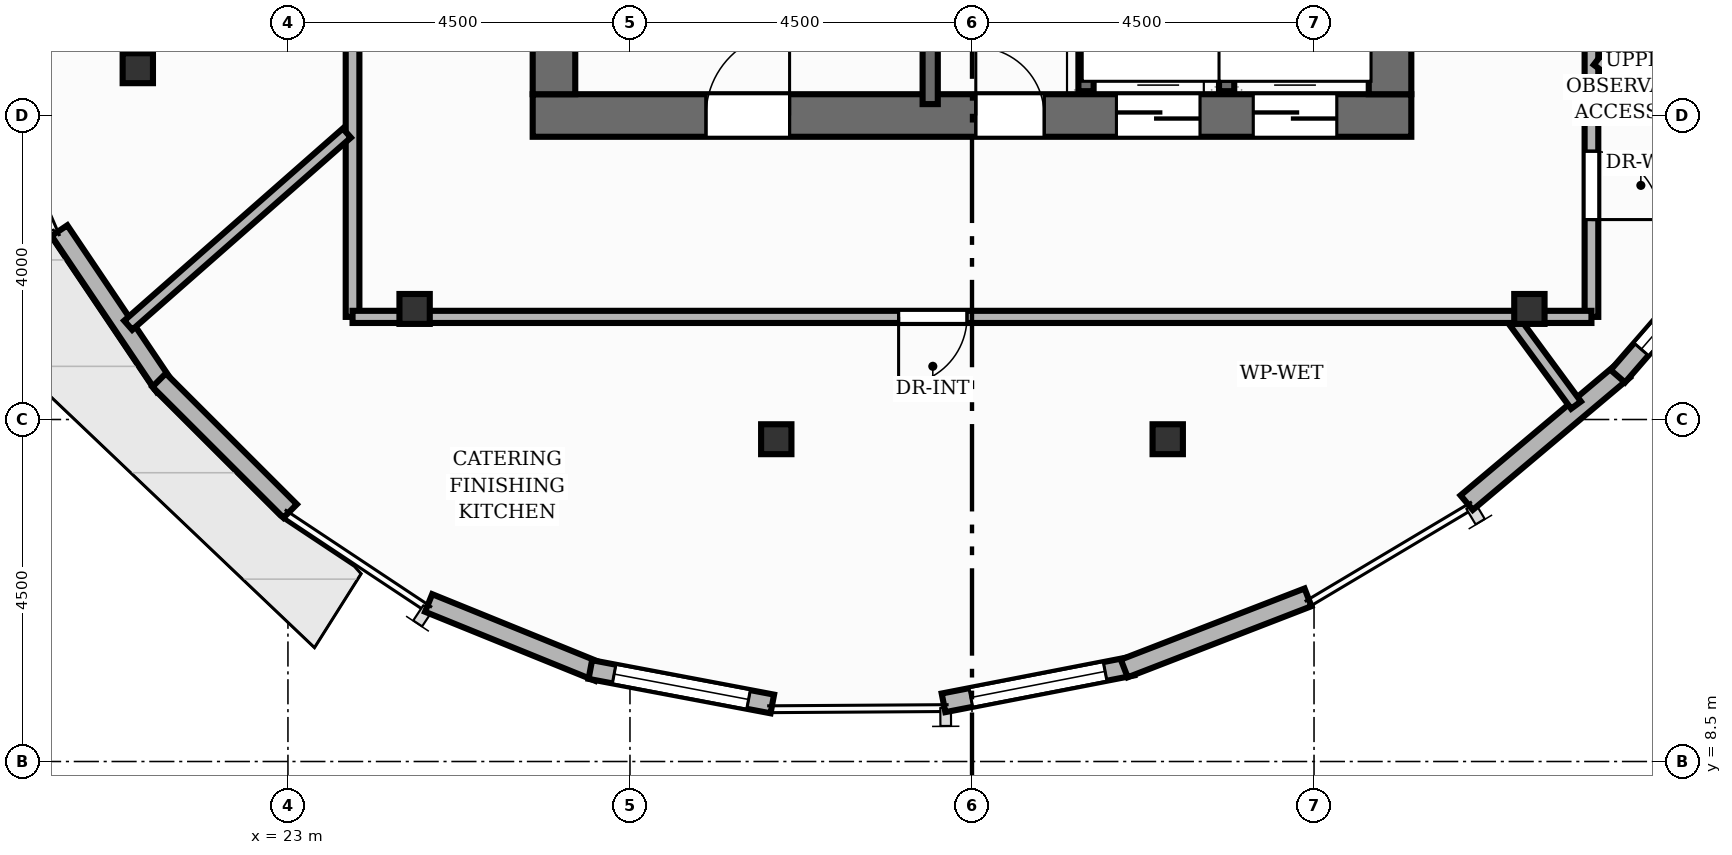
"""IFC4 building model, lengths in metres.
Left out: names, types, materials, properties, quantities, classifications, styles, units other than length and angle.
Written with IfcOpenShell. Run it as: python <this file> out.ifc"""

import sys

from ifc_helpers import new_model, si_unit, direction, frame, frame_2d, origin, origin_2d, place, context, subcontext, project, spatial, rectangle, i_section, extrude, element, fill, save


model = new_model("IFC4")
c1 = context("Model", 3, precision=1e-05, world=origin(), true_north=direction((0.0, 1.0)))
c2 = subcontext(c1, "Body", "Model", "MODEL_VIEW")
j1 = project(units=[si_unit("LENGTHUNIT", "METRE"), si_unit("PLANEANGLEUNIT", "RADIAN")], contexts=[c1])
p1 = place(None, origin())
s1 = spatial("IfcSite", under=j1, at=p1, CompositionType="ELEMENT")
p2 = place(p1, origin())
s2 = spatial("IfcBuilding", under=s1, at=p2, CompositionType="ELEMENT")
p3 = place(p2, frame((0.0, 0.0, 246.88)))
s3 = spatial("IfcBuildingStorey", under=s2, at=p3, CompositionType="ELEMENT", Elevation=246.88)
p4 = place(p3, frame((26.22, 17.0, 0.0), z_axis=(0.0, 0.0, 1.0), x_axis=(1.0, 0.0, 0.0)))
e1 = element("IfcWall", 1, at=p4, inside=s3, PredefinedType="SHEAR", context=c2, shape_type="SweptSolid", body=[
    extrude(rectangle(XDim=11.56, YDim=0.56, at=frame_2d((5.78, 0.0))), origin(), (0.0, 0.0, 1.0), 4.16),
])
p5 = place(p4, frame((2.28, 0.0, 0.0)))
e2 = element("IfcOpeningElement", 2, at=p5, cuts=e1, PredefinedType="OPENING", context=c2, shape_type="SweptSolid", body=[
    extrude(rectangle(XDim=1.1, YDim=2.15, at=frame_2d((0.55, 1.075))), frame((0.0, 0.29, 0.0), z_axis=(0.0, -1.0, 0.0), x_axis=(1.0, 0.0, 0.0)), (0.0, 0.0, 1.0), 0.58),
])
p6 = place(p4, frame((7.68, 0.0, 0.0)))
e3 = element("IfcOpeningElement", 3, at=p6, cuts=e1, PredefinedType="OPENING", context=c2, shape_type="SweptSolid", body=[
    extrude(rectangle(XDim=1.1, YDim=2.15, at=frame_2d((0.55, 1.075))), frame((0.0, 0.29, 0.0), z_axis=(0.0, -1.0, 0.0), x_axis=(1.0, 0.0, 0.0)), (0.0, 0.0, 1.0), 0.58),
])
p7 = place(p4, frame((9.48, 0.0, 0.0)))
e4 = element("IfcOpeningElement", 4, at=p7, cuts=e1, PredefinedType="OPENING", context=c2, shape_type="SweptSolid", body=[
    extrude(rectangle(XDim=1.1, YDim=2.15, at=frame_2d((0.55, 1.075))), frame((0.0, 0.29, 0.0), z_axis=(0.0, -1.0, 0.0), x_axis=(1.0, 0.0, 0.0)), (0.0, 0.0, 1.0), 0.58),
])
p8 = place(p4, frame((5.83, 0.0, 0.0)))
e5 = element("IfcOpeningElement", 5, at=p8, cuts=e1, PredefinedType="OPENING", context=c2, shape_type="SweptSolid", body=[
    extrude(rectangle(XDim=0.9, YDim=2.1, at=frame_2d((0.45, 1.05))), frame((0.0, 0.29, 0.0), z_axis=(0.0, -1.0, 0.0), x_axis=(1.0, 0.0, 0.0)), (0.0, 0.0, 1.0), 0.58),
])
for number, where, z_axis, x_axis in (
    (6, (26.5, 17.28, 0.0), (0.0, 0.0, 1.0), (0.0, 1.0, 0.0)),
    (7, (37.5, 17.28, 0.0), (0.0, 0.0, 1.0), (0.0, 1.0, 0.0)),
):
    element("IfcWall", number, at=place(p3, frame(where, z_axis=z_axis, x_axis=x_axis)), inside=s3, PredefinedType="SHEAR", context=c2, shape_type="SweptSolid", body=[
        extrude(rectangle(XDim=13.44, YDim=0.56, at=frame_2d((6.72, 0.0))), origin(), (0.0, 0.0, 1.0), 4.16),
    ])
for number, where, z_axis, x_axis in (
    (8, (21.025, 17.622, 0.0), (0.0, 0.0, 1.0), (1.0, 0.0, 0.0)),
    (9, (24.667, 14.455, 0.0), (0.0, 0.0, 1.0), (1.0, 0.0, 0.0)),
    (10, (29.425, 12.74, 0.0), (0.0, 0.0, 1.0), (1.0, 0.0, 0.0)),
    (11, (34.575, 12.74, 0.0), (0.0, 0.0, 1.0), (1.0, 0.0, 0.0)),
    (12, (39.333, 14.455, 0.0), (0.0, 0.0, 1.0), (1.0, 0.0, 0.0)),
):
    element("IfcColumn", number, at=place(p3, frame(where, z_axis=z_axis, x_axis=x_axis)), inside=s3, PredefinedType="COLUMN", context=c2, shape_type="SweptSolid", body=[
        extrude(i_section(OverallWidth=0.399, OverallDepth=0.394, WebThickness=0.023, FlangeThickness=0.037, at=origin_2d()), origin(), (0.0, 0.0, 1.0), 4.16),
    ])
p9 = place(p3, frame((21.377, 13.43, 0.0), z_axis=(0.0, 0.0, 1.0), x_axis=(-0.558536746098, 0.829479778691, 0.0)))
e13 = element("IfcWall", 13, at=p9, inside=s3, PredefinedType="SOLIDWALL", context=c2, shape_type="SweptSolid", body=[
    extrude(rectangle(XDim=2.478, YDim=0.25, at=frame_2d((1.239, 0.0))), origin(), (0.0, 0.0, 1.0), 3.84),
])
p10 = place(p3, frame((23.029, 11.796, 0.0), z_axis=(0.0, 0.0, 1.0), x_axis=(-0.707507464916, 0.70670587028, 0.0)))
e14 = element("IfcWall", 14, at=p10, inside=s3, PredefinedType="SOLIDWALL", context=c2, shape_type="SweptSolid", body=[
    extrude(rectangle(XDim=2.437, YDim=0.25, at=frame_2d((1.218, 0.0))), origin(), (0.0, 0.0, 1.0), 3.84),
])
p11 = place(p3, frame((27.088, 9.678, 0.0), z_axis=(0.0, 0.0, 1.0), x_axis=(-0.92656790733, 0.376127522399, 0.0)))
e15 = element("IfcWall", 15, at=p11, inside=s3, PredefinedType="SOLIDWALL", context=c2, shape_type="SweptSolid", body=[
    extrude(rectangle(XDim=2.415, YDim=0.25, at=frame_2d((1.207, 0.0))), origin(), (0.0, 0.0, 1.0), 3.84),
])
p12 = place(p3, frame((29.373, 9.257, 0.0), z_axis=(0.0, 0.0, 1.0), x_axis=(-0.982577169387, 0.185855067728, 0.0)))
e16 = element("IfcWall", 16, at=p12, inside=s3, PredefinedType="SOLIDWALL", context=c2, shape_type="SweptSolid", body=[
    extrude(rectangle(XDim=2.437, YDim=0.25, at=frame_2d((1.218, 0.0))), origin(), (0.0, 0.0, 1.0), 3.84),
])
p13 = place(p12, frame((0.318, 0.0, 0.85)))
e17 = element("IfcOpeningElement", 17, at=p13, cuts=e16, PredefinedType="OPENING", context=c2, shape_type="SweptSolid", body=[
    extrude(rectangle(XDim=1.8, YDim=2.0, at=frame_2d((0.9, 1.0))), frame((0.0, 0.135, 0.0), z_axis=(0.0, -1.0, 0.0), x_axis=(1.0, 0.0, 0.0)), (0.0, 0.0, 1.0), 0.27),
])
p14 = place(p3, frame((34.111, 9.755, 0.0), z_axis=(0.0, 0.0, 1.0), x_axis=(-0.98160535152, -0.190921276622, 0.0)))
e18 = element("IfcWall", 18, at=p14, inside=s3, PredefinedType="SOLIDWALL", context=c2, shape_type="SweptSolid", body=[
    extrude(rectangle(XDim=2.532, YDim=0.25, at=frame_2d((1.266, 0.0))), origin(), (0.0, 0.0, 1.0), 3.84),
])
p15 = place(p14, frame((0.366, 0.0, 0.85)))
e19 = element("IfcOpeningElement", 19, at=p15, cuts=e18, PredefinedType="OPENING", context=c2, shape_type="SweptSolid", body=[
    extrude(rectangle(XDim=1.8, YDim=2.0, at=frame_2d((0.9, 1.0))), frame((0.0, 0.135, 0.0), z_axis=(0.0, -1.0, 0.0), x_axis=(1.0, 0.0, 0.0)), (0.0, 0.0, 1.0), 0.27),
])
p16 = place(p3, frame((36.421, 10.66, 0.0), z_axis=(0.0, 0.0, 1.0), x_axis=(-0.932613090392, -0.360877851397, 0.0)))
e20 = element("IfcWall", 20, at=p16, inside=s3, PredefinedType="SOLIDWALL", context=c2, shape_type="SweptSolid", body=[
    extrude(rectangle(XDim=2.593, YDim=0.25, at=frame_2d((1.296, 0.0))), origin(), (0.0, 0.0, 1.0), 3.84),
])
p17 = place(p3, frame((40.575, 13.646, 0.0), z_axis=(0.0, 0.0, 1.0), x_axis=(-0.765011949935, -0.644016084005, 0.0)))
e21 = element("IfcWall", 21, at=p17, inside=s3, PredefinedType="SOLIDWALL", context=c2, shape_type="SweptSolid", body=[
    extrude(rectangle(XDim=2.702, YDim=0.25, at=frame_2d((1.351, 0.0))), origin(), (0.0, 0.0, 1.0), 3.84),
])
p18 = place(p3, frame((42.292, 15.637, 0.0), z_axis=(0.0, 0.0, 1.0), x_axis=(-0.655463265554, -0.755227056924, 0.0)))
e22 = element("IfcWall", 22, at=p18, inside=s3, PredefinedType="SOLIDWALL", context=c2, shape_type="SweptSolid", body=[
    extrude(rectangle(XDim=2.738, YDim=0.25, at=frame_2d((1.369, 0.0))), origin(), (0.0, 0.0, 1.0), 3.84),
])
p19 = place(p18, frame((0.469, 0.0, 0.85)))
e23 = element("IfcOpeningElement", 23, at=p19, cuts=e22, PredefinedType="OPENING", context=c2, shape_type="SweptSolid", body=[
    extrude(rectangle(XDim=1.8, YDim=2.0, at=frame_2d((0.9, 1.0))), frame((0.0, 0.135, 0.0), z_axis=(0.0, -1.0, 0.0), x_axis=(1.0, 0.0, 0.0)), (0.0, 0.0, 1.0), 0.27),
])
p20 = place(p3, frame((31.45, 17.15, 0.0), z_axis=(0.0, 0.0, 1.0), x_axis=(0.0, 1.0, 0.0)))
e24 = element("IfcWall", 24, at=p20, inside=s3, PredefinedType="SHEAR", context=c2, shape_type="SweptSolid", body=[
    extrude(rectangle(XDim=3.5, YDim=0.2, at=frame_2d((1.75, 0.0))), origin(), (0.0, 0.0, 1.0), 4.16),
])
for number, where, z_axis, x_axis in (
    (25, (33.5, 17.32, 0.0), (0.0, 0.0, 1.0), (0.0, 1.0, 0.0)),
    (26, (35.35, 17.32, 0.0), (0.0, 0.0, 1.0), (0.0, 1.0, 0.0)),
):
    element("IfcWall", number, at=place(p3, frame(where, z_axis=z_axis, x_axis=x_axis)), inside=s3, PredefinedType="SHEAR", context=c2, shape_type="SweptSolid", body=[
        extrude(rectangle(XDim=1.86, YDim=0.2, at=frame_2d((0.93, 0.0))), origin(), (0.0, 0.0, 1.0), 4.16),
    ])
p21 = place(p3, frame((40.15, 33.59, 0.0), z_axis=(0.0, 0.0, 1.0), x_axis=(0.0, -1.0, 0.0)))
e27 = element("IfcWall", 27, at=p21, inside=s3, PredefinedType="PARTITIONING", context=c2, shape_type="SweptSolid", body=[
    extrude(rectangle(XDim=19.24, YDim=0.18, at=frame_2d((9.62, 0.0))), origin(), (0.0, 0.0, 1.0), 3.835),
])
p22 = place(p21, frame((9.138, 0.0, 0.0)))
e28 = element("IfcOpeningElement", 28, at=p22, cuts=e27, PredefinedType="OPENING", context=c2, shape_type="SweptSolid", body=[
    extrude(rectangle(XDim=0.9, YDim=2.1, at=frame_2d((0.45, 1.05))), frame((0.0, 0.1, 0.0), z_axis=(0.0, -1.0, 0.0), x_axis=(1.0, 0.0, 0.0)), (0.0, 0.0, 1.0), 0.2),
])
p23 = place(p21, frame((17.059, 0.0, 0.0)))
e29 = element("IfcOpeningElement", 29, at=p23, cuts=e27, PredefinedType="OPENING", context=c2, shape_type="SweptSolid", body=[
    extrude(rectangle(XDim=0.9, YDim=2.1, at=frame_2d((0.45, 1.05))), frame((0.0, 0.1, 0.0), z_axis=(0.0, -1.0, 0.0), x_axis=(1.0, 0.0, 0.0)), (0.0, 0.0, 1.0), 0.2),
])
p24 = place(p3, frame((23.85, 14.35, 0.0), z_axis=(0.0, 0.0, 1.0), x_axis=(0.0, 1.0, 0.0)))
e30 = element("IfcWall", 30, at=p24, inside=s3, PredefinedType="PARTITIONING", context=c2, shape_type="SweptSolid", body=[
    extrude(rectangle(XDim=19.3, YDim=0.18, at=frame_2d((9.65, 0.0))), origin(), (0.0, 0.0, 1.0), 3.835),
])
p25 = place(p24, frame((8.652, 0.0, 0.0)))
e31 = element("IfcOpeningElement", 31, at=p25, cuts=e30, PredefinedType="OPENING", context=c2, shape_type="SweptSolid", body=[
    extrude(rectangle(XDim=0.9, YDim=2.1, at=frame_2d((0.45, 1.05))), frame((0.0, 0.1, 0.0), z_axis=(0.0, -1.0, 0.0), x_axis=(1.0, 0.0, 0.0)), (0.0, 0.0, 1.0), 0.2),
])
p26 = place(p3, frame((40.15, 14.35, 0.0), z_axis=(0.0, 0.0, 1.0), x_axis=(-1.0, 0.0, 0.0)))
e32 = element("IfcWall", 32, at=p26, inside=s3, PredefinedType="PLUMBINGWALL", context=c2, shape_type="SweptSolid", body=[
    extrude(rectangle(XDim=16.3, YDim=0.16, at=frame_2d((8.15, 0.0))), origin(), (0.0, 0.0, 1.0), 2.9),
])
p27 = place(p26, frame((8.216, 0.0, 0.0)))
e33 = element("IfcOpeningElement", 33, at=p27, cuts=e32, PredefinedType="OPENING", context=c2, shape_type="SweptSolid", body=[
    extrude(rectangle(XDim=0.9, YDim=2.1, at=frame_2d((0.45, 1.05))), frame((0.0, 0.09, 0.0), z_axis=(0.0, -1.0, 0.0), x_axis=(1.0, 0.0, 0.0)), (0.0, 0.0, 1.0), 0.18),
])
p28 = place(p3, frame((23.775, 16.769, 0.0), z_axis=(0.0, 0.0, 1.0), x_axis=(-0.751003011948, -0.660298777862, 0.0)))
e34 = element("IfcWall", 34, at=p28, inside=s3, PredefinedType="PLUMBINGWALL", context=c2, shape_type="SweptSolid", body=[
    extrude(rectangle(XDim=3.83, YDim=0.16, at=frame_2d((1.915, 0.0))), origin(), (0.0, 0.0, 1.0), 3.835),
])
p29 = place(p3, frame((39.153, 14.269, 0.0), z_axis=(0.0, 0.0, 1.0), x_axis=(0.592279184354, -0.805732814139, 0.0)))
e35 = element("IfcWall", 35, at=p29, inside=s3, PredefinedType="PLUMBINGWALL", context=c2, shape_type="SweptSolid", body=[
    extrude(rectangle(XDim=1.341, YDim=0.16, at=frame_2d((0.67, 0.0))), origin(), (0.0, 0.0, 1.0), 2.9),
])
p30 = place(p3, frame((42.464, 16.029, 0.0), z_axis=(0.0, 0.0, 1.0), x_axis=(-0.7954816045, 0.605977736309, 0.0)))
e36 = element("IfcWall", 36, at=p30, inside=s3, PredefinedType="PLUMBINGWALL", context=c2, shape_type="SweptSolid", body=[
    extrude(rectangle(XDim=2.809, YDim=0.16, at=frame_2d((1.404, 0.0))), origin(), (0.0, 0.0, 1.0), 3.835),
])
p31 = place(p13, origin())
e37 = element("IfcWindow", 37, at=p31, inside=s3, PartitioningType="SINGLE_PANEL", PredefinedType="WINDOW", context=c2, shape_type="SweptSolid", body=[
    extrude(rectangle(XDim=1.8, YDim=2.0, at=frame_2d((0.9, 1.0))), frame((0.0, 0.03, 0.0), z_axis=(0.0, -1.0, 0.0), x_axis=(1.0, 0.0, 0.0)), (0.0, 0.0, 1.0), 0.06),
])
fill(e17, e37)
p32 = place(p15, origin())
e38 = element("IfcWindow", 38, at=p32, inside=s3, PartitioningType="SINGLE_PANEL", PredefinedType="WINDOW", context=c2, shape_type="SweptSolid", body=[
    extrude(rectangle(XDim=1.8, YDim=2.0, at=frame_2d((0.9, 1.0))), frame((0.0, 0.03, 0.0), z_axis=(0.0, -1.0, 0.0), x_axis=(1.0, 0.0, 0.0)), (0.0, 0.0, 1.0), 0.06),
])
fill(e19, e38)
p33 = place(p19, origin())
e39 = element("IfcWindow", 39, at=p33, inside=s3, PartitioningType="SINGLE_PANEL", PredefinedType="WINDOW", context=c2, shape_type="SweptSolid", body=[
    extrude(rectangle(XDim=1.8, YDim=2.0, at=frame_2d((0.9, 1.0))), frame((0.0, 0.03, 0.0), z_axis=(0.0, -1.0, 0.0), x_axis=(1.0, 0.0, 0.0)), (0.0, 0.0, 1.0), 0.06),
])
fill(e23, e39)
p34 = place(p5, origin())
e40 = element("IfcDoor", 40, at=p34, inside=s3, OperationType="SINGLE_SWING_RIGHT", PredefinedType="DOOR", context=c2, shape_type="SweptSolid", body=[
    extrude(rectangle(XDim=1.1, YDim=2.15, at=frame_2d((0.55, 1.075))), frame((0.0, 0.025, 0.0), z_axis=(0.0, -1.0, 0.0), x_axis=(1.0, 0.0, 0.0)), (0.0, 0.0, 1.0), 0.05),
])
fill(e2, e40)
p35 = place(p6, origin())
e41 = element("IfcDoor", 41, at=p35, inside=s3, OperationType="DOUBLE_DOOR_SLIDING", PredefinedType="DOOR", context=c2, shape_type="SweptSolid", body=[
    extrude(rectangle(XDim=1.1, YDim=2.15, at=frame_2d((0.55, 1.075))), frame((0.0, 0.025, 0.0), z_axis=(0.0, -1.0, 0.0), x_axis=(1.0, 0.0, 0.0)), (0.0, 0.0, 1.0), 0.05),
])
fill(e3, e41)
p36 = place(p7, origin())
e42 = element("IfcDoor", 42, at=p36, inside=s3, OperationType="DOUBLE_DOOR_SLIDING", PredefinedType="DOOR", context=c2, shape_type="SweptSolid", body=[
    extrude(rectangle(XDim=1.1, YDim=2.15, at=frame_2d((0.55, 1.075))), frame((0.0, 0.025, 0.0), z_axis=(0.0, -1.0, 0.0), x_axis=(1.0, 0.0, 0.0)), (0.0, 0.0, 1.0), 0.05),
])
fill(e4, e42)
p37 = place(p8, origin())
e43 = element("IfcDoor", 43, at=p37, inside=s3, OperationType="SINGLE_SWING_LEFT", PredefinedType="DOOR", context=c2, shape_type="SweptSolid", body=[
    extrude(rectangle(XDim=0.9, YDim=2.1, at=frame_2d((0.45, 1.05))), frame((0.0, 0.025, 0.0), z_axis=(0.0, -1.0, 0.0), x_axis=(1.0, 0.0, 0.0)), (0.0, 0.0, 1.0), 0.05),
])
fill(e5, e43)
p38 = place(p27, origin())
e44 = element("IfcDoor", 44, at=p38, inside=s3, OperationType="SINGLE_SWING_RIGHT", PredefinedType="DOOR", context=c2, shape_type="SweptSolid", body=[
    extrude(rectangle(XDim=0.9, YDim=2.1, at=frame_2d((0.45, 1.05))), frame((0.0, 0.025, 0.0), z_axis=(0.0, -1.0, 0.0), x_axis=(1.0, 0.0, 0.0)), (0.0, 0.0, 1.0), 0.05),
])
fill(e33, e44)
p39 = place(p23, origin())
e45 = element("IfcDoor", 45, at=p39, inside=s3, OperationType="SINGLE_SWING_RIGHT", PredefinedType="DOOR", context=c2, shape_type="SweptSolid", body=[
    extrude(rectangle(XDim=0.9, YDim=2.1, at=frame_2d((0.45, 1.05))), frame((0.0, 0.025, 0.0), z_axis=(0.0, -1.0, 0.0), x_axis=(1.0, 0.0, 0.0)), (0.0, 0.0, 1.0), 0.05),
])
fill(e29, e45)
save(model, sys.argv[1])
